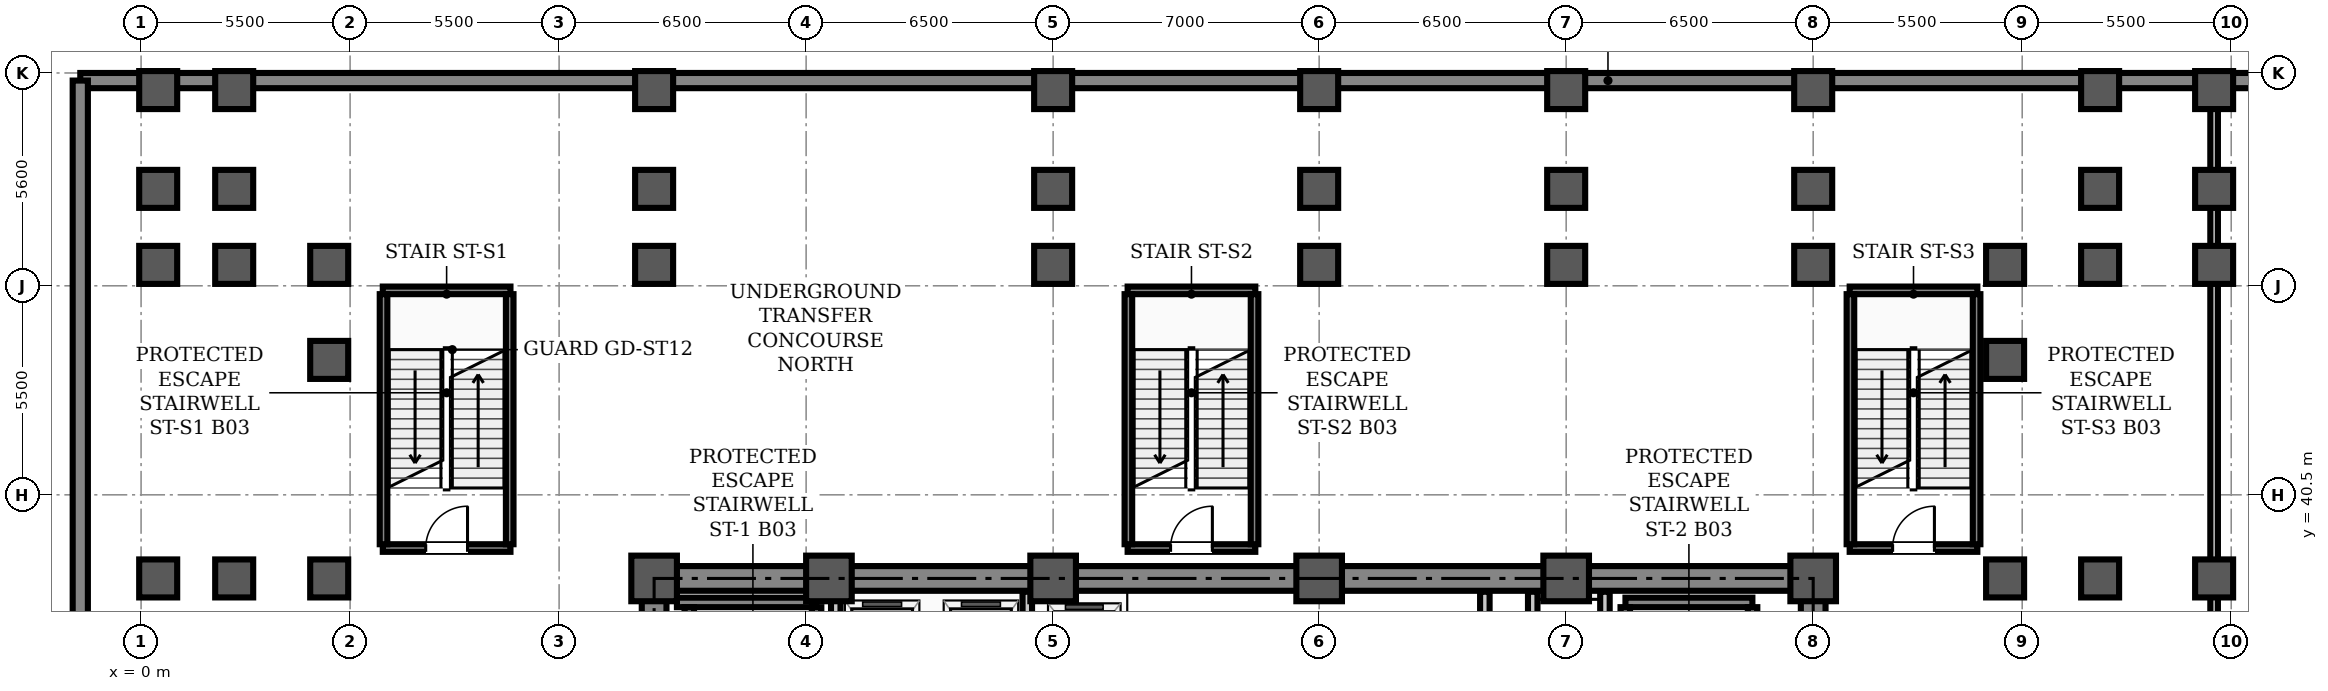
"""IFC4 building model, lengths in metres.
Left out: names, types, materials, properties, quantities, classifications, styles, units other than length and angle.
Written with IfcOpenShell. Run it as: python <this file> out.ifc"""

import sys

from ifc_helpers import new_model, si_unit, direction, frame, frame_2d, origin, origin_2d, place, context, subcontext, project, spatial, rectangle, hollow_rectangle, extrude, element, fill, save


model = new_model("IFC4")
c1 = context("Model", 3, precision=1e-05, world=origin(), true_north=direction((0.0, 1.0)))
c2 = subcontext(c1, "Body", "Model", "MODEL_VIEW")
j1 = project(units=[si_unit("LENGTHUNIT", "METRE"), si_unit("PLANEANGLEUNIT", "RADIAN")], contexts=[c1])
p1 = place(None, origin())
s1 = spatial("IfcSite", under=j1, at=p1, CompositionType="ELEMENT")
p2 = place(p1, origin())
s2 = spatial("IfcBuilding", under=s1, at=p2, CompositionType="ELEMENT")
p3 = place(p2, frame((0.0, 0.0, -15.6)))
s3 = spatial("IfcBuildingStorey", under=s2, at=p3, CompositionType="ELEMENT", Elevation=-15.6)
for number, where, z_axis, x_axis in (
    (1, (13.5, 38.3, 0.0), (0.0, 0.0, 1.0), (1.0, 0.0, 0.0)),
    (2, (18.1, 38.3, 0.0), (0.0, 0.0, 1.0), (1.0, 0.0, 0.0)),
    (3, (24.0, 38.3, 0.0), (0.0, 0.0, 1.0), (1.0, 0.0, 0.0)),
    (4, (31.0, 38.3, 0.0), (0.0, 0.0, 1.0), (1.0, 0.0, 0.0)),
    (5, (37.5, 38.3, 0.0), (0.0, 0.0, 1.0), (1.0, 0.0, 0.0)),
    (6, (44.0, 38.3, 0.0), (0.0, 0.0, 1.0), (1.0, 0.0, 0.0)),
):
    element("IfcColumn", number, at=place(p3, frame(where, z_axis=z_axis, x_axis=x_axis)), inside=s3, PredefinedType="COLUMN", context=c2, shape_type="SweptSolid", body=[
        extrude(hollow_rectangle(XDim=1.2, YDim=1.2, WallThickness=0.04, InnerFilletRadius=0.02, OuterFilletRadius=0.06, at=origin_2d()), origin(), (0.0, 0.0, 1.0), 5.4),
    ])
for number, where, z_axis, x_axis in (
    (7, (0.45, 38.3, 0.0), (0.0, 0.0, 1.0), (1.0, 0.0, 0.0)),
    (8, (0.45, 46.55, 0.0), (0.0, 0.0, 1.0), (1.0, 0.0, 0.0)),
    (9, (0.45, 48.55, 0.0), (0.0, 0.0, 1.0), (1.0, 0.0, 0.0)),
    (10, (0.45, 51.15, 0.0), (0.0, 0.0, 1.0), (1.0, 0.0, 0.0)),
    (11, (2.45, 38.3, 0.0), (0.0, 0.0, 1.0), (1.0, 0.0, 0.0)),
    (12, (2.45, 46.55, 0.0), (0.0, 0.0, 1.0), (1.0, 0.0, 0.0)),
    (13, (2.45, 48.55, 0.0), (0.0, 0.0, 1.0), (1.0, 0.0, 0.0)),
    (14, (2.45, 51.15, 0.0), (0.0, 0.0, 1.0), (1.0, 0.0, 0.0)),
    (15, (4.95, 38.3, 0.0), (0.0, 0.0, 1.0), (1.0, 0.0, 0.0)),
    (16, (4.95, 44.05, 0.0), (0.0, 0.0, 1.0), (1.0, 0.0, 0.0)),
    (17, (4.95, 46.55, 0.0), (0.0, 0.0, 1.0), (1.0, 0.0, 0.0)),
    (18, (13.5, 46.55, 0.0), (0.0, 0.0, 1.0), (1.0, 0.0, 0.0)),
    (19, (13.5, 48.55, 0.0), (0.0, 0.0, 1.0), (1.0, 0.0, 0.0)),
    (20, (13.5, 51.15, 0.0), (0.0, 0.0, 1.0), (1.0, 0.0, 0.0)),
    (21, (24.0, 46.55, 0.0), (0.0, 0.0, 1.0), (1.0, 0.0, 0.0)),
    (22, (24.0, 48.55, 0.0), (0.0, 0.0, 1.0), (1.0, 0.0, 0.0)),
    (23, (24.0, 51.15, 0.0), (0.0, 0.0, 1.0), (1.0, 0.0, 0.0)),
    (24, (31.0, 46.55, 0.0), (0.0, 0.0, 1.0), (1.0, 0.0, 0.0)),
    (25, (31.0, 48.55, 0.0), (0.0, 0.0, 1.0), (1.0, 0.0, 0.0)),
    (26, (31.0, 51.15, 0.0), (0.0, 0.0, 1.0), (1.0, 0.0, 0.0)),
    (27, (37.5, 46.55, 0.0), (0.0, 0.0, 1.0), (1.0, 0.0, 0.0)),
    (28, (37.5, 48.55, 0.0), (0.0, 0.0, 1.0), (1.0, 0.0, 0.0)),
    (29, (37.5, 51.15, 0.0), (0.0, 0.0, 1.0), (1.0, 0.0, 0.0)),
    (30, (44.0, 46.55, 0.0), (0.0, 0.0, 1.0), (1.0, 0.0, 0.0)),
    (31, (44.0, 48.55, 0.0), (0.0, 0.0, 1.0), (1.0, 0.0, 0.0)),
    (32, (44.0, 51.15, 0.0), (0.0, 0.0, 1.0), (1.0, 0.0, 0.0)),
    (33, (49.05, 38.3, 0.0), (0.0, 0.0, 1.0), (1.0, 0.0, 0.0)),
    (34, (49.05, 44.05, 0.0), (0.0, 0.0, 1.0), (1.0, 0.0, 0.0)),
    (35, (49.05, 46.55, 0.0), (0.0, 0.0, 1.0), (1.0, 0.0, 0.0)),
    (36, (51.55, 38.3, 0.0), (0.0, 0.0, 1.0), (1.0, 0.0, 0.0)),
    (37, (51.55, 46.55, 0.0), (0.0, 0.0, 1.0), (1.0, 0.0, 0.0)),
    (38, (51.55, 48.55, 0.0), (0.0, 0.0, 1.0), (1.0, 0.0, 0.0)),
    (39, (51.55, 51.15, 0.0), (0.0, 0.0, 1.0), (1.0, 0.0, 0.0)),
    (40, (54.55, 38.3, 0.0), (0.0, 0.0, 1.0), (1.0, 0.0, 0.0)),
    (41, (54.55, 46.55, 0.0), (0.0, 0.0, 1.0), (1.0, 0.0, 0.0)),
    (42, (54.55, 48.55, 0.0), (0.0, 0.0, 1.0), (1.0, 0.0, 0.0)),
    (43, (54.55, 51.15, 0.0), (0.0, 0.0, 1.0), (1.0, 0.0, 0.0)),
):
    element("IfcColumn", number, at=place(p3, frame(where, z_axis=z_axis, x_axis=x_axis)), inside=s3, PredefinedType="COLUMN", context=c2, shape_type="SweptSolid", body=[
        extrude(rectangle(XDim=1.0, YDim=1.0, at=origin_2d()), origin(), (0.0, 0.0, 1.0), 5.4),
    ])
p4 = place(p3, frame((78.8, 51.4, 0.0), z_axis=(0.0, 0.0, 1.0), x_axis=(-1.0, 0.0, 0.0)))
e44 = element("IfcWall", 44, at=p4, inside=s3, PredefinedType="SOLIDWALL", context=c2, shape_type="SweptSolid", body=[
    extrude(rectangle(XDim=80.4, YDim=0.4, at=frame_2d((40.2, 0.0))), origin(), (0.0, 0.0, 1.0), 5.12),
])
p5 = place(p3, frame((-1.6, 51.4, 0.0), z_axis=(0.0, 0.0, 1.0), x_axis=(0.0, -1.0, 0.0)))
e45 = element("IfcWall", 45, at=p5, inside=s3, PredefinedType="SOLIDWALL", context=c2, shape_type="SweptSolid", body=[
    extrude(rectangle(XDim=51.2, YDim=0.4, at=frame_2d((25.6, 0.0))), origin(), (0.0, 0.0, 1.0), 5.12),
])
p6 = place(p3, frame((13.5, 38.3, 0.0), z_axis=(0.0, 0.0, 1.0), x_axis=(1.0, 0.0, 0.0)))
e46 = element("IfcWall", 46, at=p6, inside=s3, PredefinedType="SHEAR", context=c2, shape_type="SweptSolid", body=[
    extrude(rectangle(XDim=30.5, YDim=0.65, at=frame_2d((15.25, 0.0))), origin(), (0.0, 0.0, 1.0), 5.12),
])
for number, where, z_axis, x_axis in (
    (47, (13.5, 29.35, 0.0), (0.0, 0.0, 1.0), (0.0, 1.0, 0.0)),
    (48, (44.0, 29.35, 0.0), (0.0, 0.0, 1.0), (0.0, 1.0, 0.0)),
):
    element("IfcWall", number, at=place(p3, frame(where, z_axis=z_axis, x_axis=x_axis)), inside=s3, PredefinedType="SHEAR", context=c2, shape_type="SweptSolid", body=[
        extrude(rectangle(XDim=8.6, YDim=0.65, at=frame_2d((4.3, 0.0))), origin(), (0.0, 0.0, 1.0), 5.12),
    ])
p7 = place(p3, frame((14.1, 37.669, 0.0), z_axis=(0.0, 0.0, 1.0), x_axis=(1.0, 0.0, 0.0)))
e49 = element("IfcWall", 49, at=p7, inside=s3, PredefinedType="STANDARD", context=c2, shape_type="SweptSolid", body=[
    extrude(rectangle(XDim=3.67, YDim=0.25, at=frame_2d((1.835, 0.0))), origin(), (0.0, 0.0, 1.0), 5.12),
])
for number, where, z_axis, x_axis in (
    (50, (14.425, 30.36, 0.0), (0.0, 0.0, 1.0), (0.0, 1.0, 0.0)),
    (51, (17.775, 30.36, 0.0), (0.0, 0.0, 1.0), (0.0, 1.0, 0.0)),
):
    element("IfcWall", number, at=place(p3, frame(where, z_axis=z_axis, x_axis=x_axis)), inside=s3, PredefinedType="STANDARD", context=c2, shape_type="SweptSolid", body=[
        extrude(rectangle(XDim=7.184, YDim=0.25, at=frame_2d((3.592, 0.0))), origin(), (0.0, 0.0, 1.0), 5.12),
    ])
p8 = place(p3, frame((39.06, 37.669, 0.0), z_axis=(0.0, 0.0, 1.0), x_axis=(1.0, 0.0, 0.0)))
e52 = element("IfcWall", 52, at=p8, inside=s3, PredefinedType="STANDARD", context=c2, shape_type="SweptSolid", body=[
    extrude(rectangle(XDim=3.34, YDim=0.25, at=frame_2d((1.67, 0.0))), origin(), (0.0, 0.0, 1.0), 5.12),
])
for number, where, z_axis, x_axis in (
    (53, (39.055, 30.36, 0.0), (0.0, 0.0, 1.0), (0.0, 1.0, 0.0)),
    (54, (42.405, 30.36, 0.0), (0.0, 0.0, 1.0), (0.0, 1.0, 0.0)),
):
    element("IfcWall", number, at=place(p3, frame(where, z_axis=z_axis, x_axis=x_axis)), inside=s3, PredefinedType="STANDARD", context=c2, shape_type="SweptSolid", body=[
        extrude(rectangle(XDim=7.184, YDim=0.25, at=frame_2d((3.592, 0.0))), origin(), (0.0, 0.0, 1.0), 5.12),
    ])
p9 = place(p3, frame((36.62, 31.95, 0.0), z_axis=(0.0, 0.0, 1.0), x_axis=(0.0, 1.0, 0.0)))
e55 = element("IfcWall", 55, at=p9, inside=s3, PredefinedType="STANDARD", context=c2, shape_type="SweptSolid", body=[
    extrude(rectangle(XDim=6.0, YDim=0.25, at=frame_2d((3.0, 0.0))), origin(), (0.0, 0.0, 1.0), 4.3),
])
p10 = place(p9, frame((4.0, 0.0, 0.0)))
e56 = element("IfcOpeningElement", 56, at=p10, cuts=e55, PredefinedType="OPENING", context=c2, shape_type="SweptSolid", body=[
    extrude(rectangle(XDim=1.1, YDim=2.08, at=frame_2d((0.55, 1.04))), frame((0.0, 0.135, 0.0), z_axis=(0.0, -1.0, 0.0), x_axis=(1.0, 0.0, 0.0)), (0.0, 0.0, 1.0), 0.27),
])
p11 = place(p3, frame((38.52, 31.95, 0.0), z_axis=(0.0, 0.0, 1.0), x_axis=(0.0, 1.0, 0.0)))
e57 = element("IfcWall", 57, at=p11, inside=s3, PredefinedType="STANDARD", context=c2, shape_type="SweptSolid", body=[
    extrude(rectangle(XDim=6.0, YDim=0.25, at=frame_2d((3.0, 0.0))), origin(), (0.0, 0.0, 1.0), 4.3),
])
for number, where, z_axis, x_axis in (
    (58, (18.28, 34.62, 0.0), (0.0, 0.0, 1.0), (0.0, 1.0, 0.0)),
    (59, (23.32, 34.62, 0.0), (0.0, 0.0, 1.0), (0.0, 1.0, 0.0)),
):
    element("IfcWall", number, at=place(p3, frame(where, z_axis=z_axis, x_axis=x_axis)), inside=s3, PredefinedType="STANDARD", context=c2, shape_type="SweptSolid", body=[
        extrude(rectangle(XDim=3.33, YDim=0.25, at=frame_2d((1.665, 0.0))), origin(), (0.0, 0.0, 1.0), 4.3),
    ])
p12 = place(p3, frame((35.36, 34.9, 0.0), z_axis=(0.0, 0.0, 1.0), x_axis=(0.0, 1.0, 0.0)))
e60 = element("IfcWall", 60, at=p12, inside=s3, PredefinedType="STANDARD", context=c2, shape_type="SweptSolid", body=[
    extrude(rectangle(XDim=3.05, YDim=0.25, at=frame_2d((1.525, 0.0))), origin(), (0.0, 0.0, 1.0), 4.3),
])
p13 = place(p3, frame((6.36, 39.1, 0.0), z_axis=(0.0, 0.0, 1.0), x_axis=(1.0, 0.0, 0.0)))
e61 = element("IfcWall", 61, at=p13, inside=s3, PredefinedType="STANDARD", context=c2, shape_type="SweptSolid", body=[
    extrude(rectangle(XDim=3.36, YDim=0.2, at=frame_2d((1.68, 0.0))), origin(), (0.0, 0.0, 1.0), 5.12),
])
p14 = place(p13, frame((1.13, 0.0, 0.0)))
e62 = element("IfcOpeningElement", 62, at=p14, cuts=e61, PredefinedType="OPENING", context=c2, shape_type="SweptSolid", body=[
    extrude(rectangle(XDim=1.1, YDim=2.08, at=frame_2d((0.55, 1.04))), frame((0.0, 0.11, 0.0), z_axis=(0.0, -1.0, 0.0), x_axis=(1.0, 0.0, 0.0)), (0.0, 0.0, 1.0), 0.22),
])
p15 = place(p3, frame((6.36, 45.88, 0.0), z_axis=(0.0, 0.0, 1.0), x_axis=(1.0, 0.0, 0.0)))
e63 = element("IfcWall", 63, at=p15, inside=s3, PredefinedType="STANDARD", context=c2, shape_type="SweptSolid", body=[
    extrude(rectangle(XDim=3.36, YDim=0.2, at=frame_2d((1.68, 0.0))), origin(), (0.0, 0.0, 1.0), 5.12),
])
for number, where, z_axis, x_axis in (
    (64, (6.38, 39.2, 0.0), (0.0, 0.0, 1.0), (0.0, 1.0, 0.0)),
    (65, (9.7, 39.2, 0.0), (0.0, 0.0, 1.0), (0.0, 1.0, 0.0)),
):
    element("IfcWall", number, at=place(p3, frame(where, z_axis=z_axis, x_axis=x_axis)), inside=s3, PredefinedType="STANDARD", context=c2, shape_type="SweptSolid", body=[
        extrude(rectangle(XDim=6.58, YDim=0.2, at=frame_2d((3.29, 0.0))), origin(), (0.0, 0.0, 1.0), 5.12),
    ])
p16 = place(p3, frame((25.96, 39.1, 0.0), z_axis=(0.0, 0.0, 1.0), x_axis=(1.0, 0.0, 0.0)))
e66 = element("IfcWall", 66, at=p16, inside=s3, PredefinedType="STANDARD", context=c2, shape_type="SweptSolid", body=[
    extrude(rectangle(XDim=3.36, YDim=0.2, at=frame_2d((1.68, 0.0))), origin(), (0.0, 0.0, 1.0), 5.12),
])
p17 = place(p16, frame((1.13, 0.0, 0.0)))
e67 = element("IfcOpeningElement", 67, at=p17, cuts=e66, PredefinedType="OPENING", context=c2, shape_type="SweptSolid", body=[
    extrude(rectangle(XDim=1.1, YDim=2.08, at=frame_2d((0.55, 1.04))), frame((0.0, 0.11, 0.0), z_axis=(0.0, -1.0, 0.0), x_axis=(1.0, 0.0, 0.0)), (0.0, 0.0, 1.0), 0.22),
])
p18 = place(p3, frame((25.96, 45.88, 0.0), z_axis=(0.0, 0.0, 1.0), x_axis=(1.0, 0.0, 0.0)))
e68 = element("IfcWall", 68, at=p18, inside=s3, PredefinedType="STANDARD", context=c2, shape_type="SweptSolid", body=[
    extrude(rectangle(XDim=3.36, YDim=0.2, at=frame_2d((1.68, 0.0))), origin(), (0.0, 0.0, 1.0), 5.12),
])
for number, where, z_axis, x_axis in (
    (69, (25.98, 39.2, 0.0), (0.0, 0.0, 1.0), (0.0, 1.0, 0.0)),
    (70, (29.3, 39.2, 0.0), (0.0, 0.0, 1.0), (0.0, 1.0, 0.0)),
):
    element("IfcWall", number, at=place(p3, frame(where, z_axis=z_axis, x_axis=x_axis)), inside=s3, PredefinedType="STANDARD", context=c2, shape_type="SweptSolid", body=[
        extrude(rectangle(XDim=6.58, YDim=0.2, at=frame_2d((3.29, 0.0))), origin(), (0.0, 0.0, 1.0), 5.12),
    ])
p19 = place(p3, frame((44.96, 39.1, 0.0), z_axis=(0.0, 0.0, 1.0), x_axis=(1.0, 0.0, 0.0)))
e71 = element("IfcWall", 71, at=p19, inside=s3, PredefinedType="STANDARD", context=c2, shape_type="SweptSolid", body=[
    extrude(rectangle(XDim=3.36, YDim=0.2, at=frame_2d((1.68, 0.0))), origin(), (0.0, 0.0, 1.0), 5.12),
])
p20 = place(p19, frame((1.13, 0.0, 0.0)))
e72 = element("IfcOpeningElement", 72, at=p20, cuts=e71, PredefinedType="OPENING", context=c2, shape_type="SweptSolid", body=[
    extrude(rectangle(XDim=1.1, YDim=2.08, at=frame_2d((0.55, 1.04))), frame((0.0, 0.11, 0.0), z_axis=(0.0, -1.0, 0.0), x_axis=(1.0, 0.0, 0.0)), (0.0, 0.0, 1.0), 0.22),
])
p21 = place(p3, frame((44.96, 45.88, 0.0), z_axis=(0.0, 0.0, 1.0), x_axis=(1.0, 0.0, 0.0)))
e73 = element("IfcWall", 73, at=p21, inside=s3, PredefinedType="STANDARD", context=c2, shape_type="SweptSolid", body=[
    extrude(rectangle(XDim=3.36, YDim=0.2, at=frame_2d((1.68, 0.0))), origin(), (0.0, 0.0, 1.0), 5.12),
])
for number, where, z_axis, x_axis in (
    (74, (44.98, 39.2, 0.0), (0.0, 0.0, 1.0), (0.0, 1.0, 0.0)),
    (75, (48.3, 39.2, 0.0), (0.0, 0.0, 1.0), (0.0, 1.0, 0.0)),
):
    element("IfcWall", number, at=place(p3, frame(where, z_axis=z_axis, x_axis=x_axis)), inside=s3, PredefinedType="STANDARD", context=c2, shape_type="SweptSolid", body=[
        extrude(rectangle(XDim=6.58, YDim=0.2, at=frame_2d((3.29, 0.0))), origin(), (0.0, 0.0, 1.0), 5.12),
    ])
p22 = place(p3, frame((54.55, 0.4, 0.0), z_axis=(0.0, 0.0, 1.0), x_axis=(0.0, 1.0, 0.0)))
e76 = element("IfcWall", 76, at=p22, inside=s3, PredefinedType="STANDARD", context=c2, shape_type="SweptSolid", body=[
    extrude(rectangle(XDim=50.8, YDim=0.2, at=frame_2d((25.4, 0.0))), origin(), (0.0, 0.0, 1.0), 4.3),
])
p23 = place(p22, frame((21.9, 0.0, 0.0)))
e77 = element("IfcOpeningElement", 77, at=p23, cuts=e76, PredefinedType="OPENING", context=c2, shape_type="SweptSolid", body=[
    extrude(rectangle(XDim=1.1, YDim=2.08, at=frame_2d((0.55, 1.04))), frame((0.0, 0.11, 0.0), z_axis=(0.0, -1.0, 0.0), x_axis=(1.0, 0.0, 0.0)), (0.0, 0.0, 1.0), 0.22),
])
p24 = place(p14, origin())
e78 = element("IfcDoor", 78, at=p24, inside=s3, OperationType="SINGLE_SWING_RIGHT", PredefinedType="DOOR", context=c2, shape_type="SweptSolid", body=[
    extrude(rectangle(XDim=1.1, YDim=2.08, at=frame_2d((0.55, 1.04))), frame((0.0, 0.025, 0.0), z_axis=(0.0, -1.0, 0.0), x_axis=(1.0, 0.0, 0.0)), (0.0, 0.0, 1.0), 0.05),
])
fill(e62, e78)
p25 = place(p17, origin())
e79 = element("IfcDoor", 79, at=p25, inside=s3, OperationType="SINGLE_SWING_RIGHT", PredefinedType="DOOR", context=c2, shape_type="SweptSolid", body=[
    extrude(rectangle(XDim=1.1, YDim=2.08, at=frame_2d((0.55, 1.04))), frame((0.0, 0.025, 0.0), z_axis=(0.0, -1.0, 0.0), x_axis=(1.0, 0.0, 0.0)), (0.0, 0.0, 1.0), 0.05),
])
fill(e67, e79)
p26 = place(p20, origin())
e80 = element("IfcDoor", 80, at=p26, inside=s3, OperationType="SINGLE_SWING_RIGHT", PredefinedType="DOOR", context=c2, shape_type="SweptSolid", body=[
    extrude(rectangle(XDim=1.1, YDim=2.08, at=frame_2d((0.55, 1.04))), frame((0.0, 0.025, 0.0), z_axis=(0.0, -1.0, 0.0), x_axis=(1.0, 0.0, 0.0)), (0.0, 0.0, 1.0), 0.05),
])
fill(e72, e80)
save(model, sys.argv[1])
